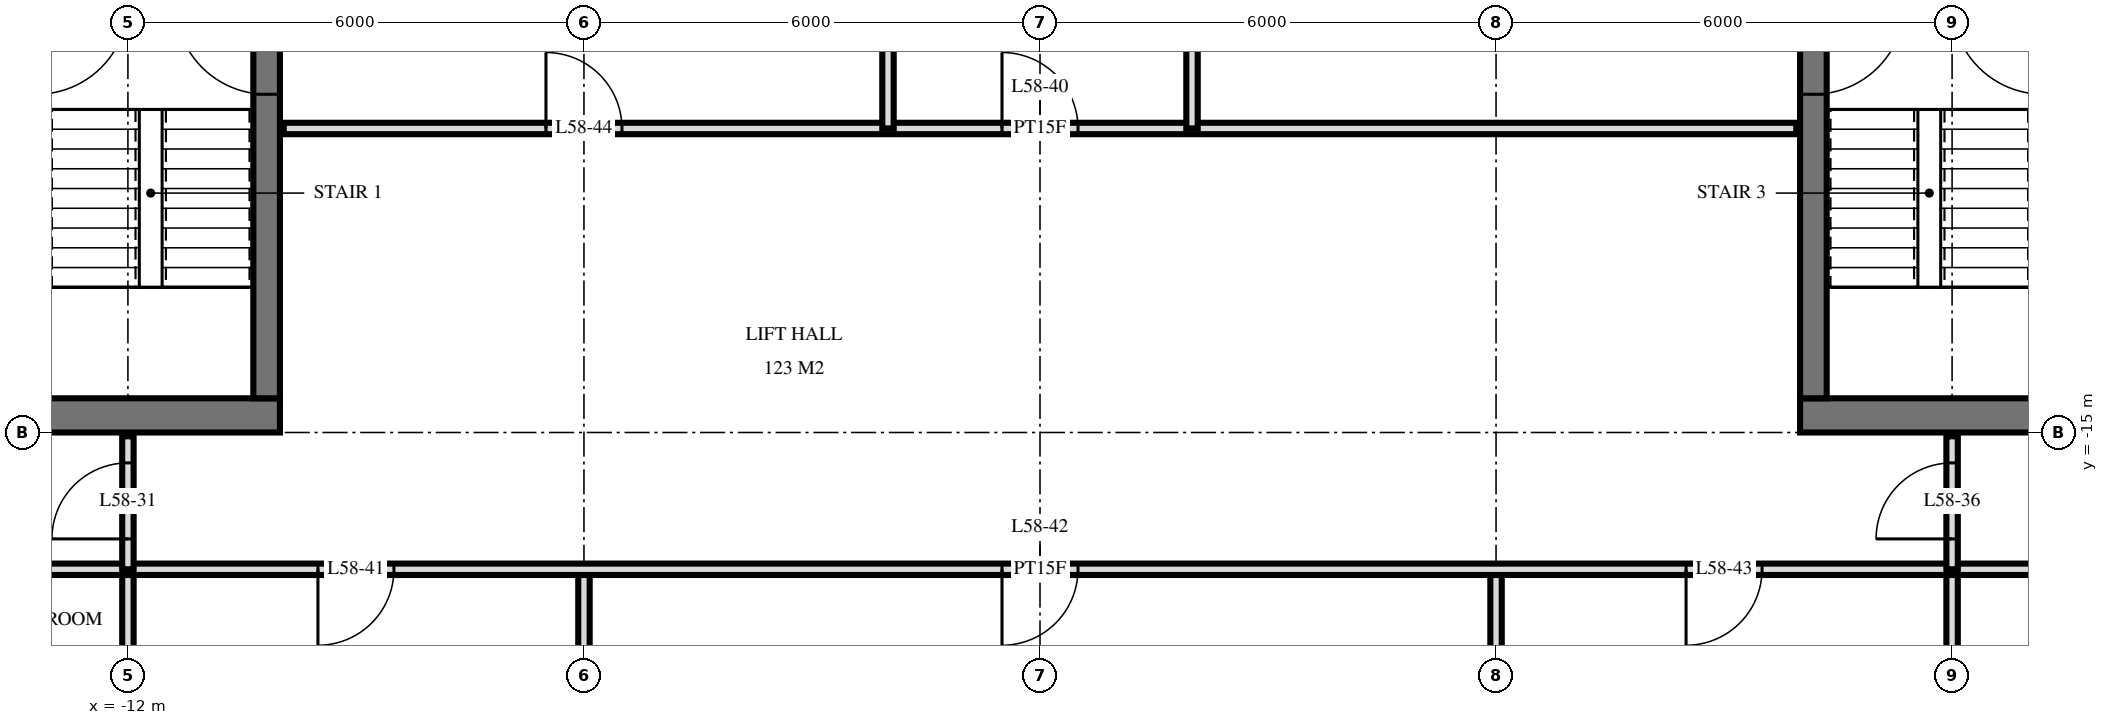
"""IFC4 building model, lengths in metres.
Left out: names, types, materials, properties, quantities, classifications, styles, units other than length and angle.
Written with IfcOpenShell. Run it as: python <this file> out.ifc"""

import sys

from ifc_helpers import new_model, si_unit, direction, frame, frame_2d, origin, place, context, subcontext, project, spatial, rectangle, extrude, element, fill, save


model = new_model("IFC4")
c1 = context("Model", 3, precision=1e-05, world=origin(), true_north=direction((0.0, 1.0)))
c2 = subcontext(c1, "Body", "Model", "MODEL_VIEW")
j1 = project(units=[si_unit("LENGTHUNIT", "METRE"), si_unit("PLANEANGLEUNIT", "RADIAN")], contexts=[c1])
p1 = place(None, origin())
s1 = spatial("IfcSite", under=j1, at=p1, CompositionType="ELEMENT")
p2 = place(p1, origin())
s2 = spatial("IfcBuilding", under=s1, at=p2, CompositionType="ELEMENT")
p3 = place(p2, frame((0.0, 0.0, 222.1)))
s3 = spatial("IfcBuildingStorey", under=s2, at=p3, CompositionType="ELEMENT", Elevation=222.1)
p4 = place(p3, frame((-24.5, -14.775, 0.0), z_axis=(0.0, 0.0, 1.0), x_axis=(1.0, 0.0, 0.0)))
e1 = element("IfcWall", 1, at=p4, inside=s3, PredefinedType="SHEAR", context=c2, shape_type="SweptSolid", body=[
    extrude(rectangle(XDim=14.5, YDim=0.45, at=frame_2d((7.25, 0.0))), origin(), (0.0, 0.0, 1.0), 3.5),
])
p5 = place(p4, frame((6.2, 0.0, 0.0)))
e2 = element("IfcOpeningElement", 2, at=p5, cuts=e1, PredefinedType="OPENING", context=c2, shape_type="SweptSolid", body=[
    extrude(rectangle(XDim=1.2, YDim=2.1, at=frame_2d((0.6, 1.05))), frame((0.0, 0.235, 0.0), z_axis=(0.0, -1.0, 0.0), x_axis=(1.0, 0.0, 0.0)), (0.0, 0.0, 1.0), 0.47),
])
p6 = place(p4, frame((9.25, 0.0, 0.0)))
e3 = element("IfcOpeningElement", 3, at=p6, cuts=e1, PredefinedType="OPENING", context=c2, shape_type="SweptSolid", body=[
    extrude(rectangle(XDim=1.1, YDim=2.1, at=frame_2d((0.55, 1.05))), frame((0.0, 0.235, 0.0), z_axis=(0.0, -1.0, 0.0), x_axis=(1.0, 0.0, 0.0)), (0.0, 0.0, 1.0), 0.47),
])
p7 = place(p4, frame((3.5, 0.0, 0.0)))
e4 = element("IfcOpeningElement", 4, at=p7, cuts=e1, PredefinedType="OPENING", context=c2, shape_type="SweptSolid", body=[
    extrude(rectangle(XDim=0.9, YDim=2.1, at=frame_2d((0.45, 1.05))), frame((0.0, 0.235, 0.0), z_axis=(0.0, -1.0, 0.0), x_axis=(1.0, 0.0, 0.0)), (0.0, 0.0, 1.0), 0.47),
])
p8 = place(p4, frame((1.05, 0.0, 0.0)))
e5 = element("IfcOpeningElement", 5, at=p8, cuts=e1, PredefinedType="OPENING", context=c2, shape_type="SweptSolid", body=[
    extrude(rectangle(XDim=1.0, YDim=2.1, at=frame_2d((0.5, 1.05))), frame((0.0, 0.235, 0.0), z_axis=(0.0, -1.0, 0.0), x_axis=(1.0, 0.0, 0.0)), (0.0, 0.0, 1.0), 0.47),
])
p9 = place(p3, frame((-10.175, -14.55, 0.0), z_axis=(0.0, 0.0, 1.0), x_axis=(0.0, 1.0, 0.0)))
e6 = element("IfcWall", 6, at=p9, inside=s3, PredefinedType="SHEAR", context=c2, shape_type="SweptSolid", body=[
    extrude(rectangle(XDim=14.1, YDim=0.35, at=frame_2d((7.05, 0.0))), origin(), (0.0, 0.0, 1.0), 3.5),
])
p10 = place(p9, frame((8.4, 0.0, 0.0)))
e7 = element("IfcOpeningElement", 7, at=p10, cuts=e6, PredefinedType="OPENING", context=c2, shape_type="SweptSolid", body=[
    extrude(rectangle(XDim=1.4, YDim=2.4, at=frame_2d((0.7, 1.2))), frame((0.0, 0.185, 0.0), z_axis=(0.0, -1.0, 0.0), x_axis=(1.0, 0.0, 0.0)), (0.0, 0.0, 1.0), 0.37),
])
p11 = place(p9, frame((10.0, 0.0, 0.0)))
e8 = element("IfcOpeningElement", 8, at=p11, cuts=e6, PredefinedType="OPENING", context=c2, shape_type="SweptSolid", body=[
    extrude(rectangle(XDim=1.4, YDim=2.4, at=frame_2d((0.7, 1.2))), frame((0.0, 0.185, 0.0), z_axis=(0.0, -1.0, 0.0), x_axis=(1.0, 0.0, 0.0)), (0.0, 0.0, 1.0), 0.37),
])
p12 = place(p9, frame((4.0, 0.0, 0.0)))
e9 = element("IfcOpeningElement", 9, at=p12, cuts=e6, PredefinedType="OPENING", context=c2, shape_type="SweptSolid", body=[
    extrude(rectangle(XDim=1.2, YDim=2.1, at=frame_2d((0.6, 1.05))), frame((0.0, 0.185, 0.0), z_axis=(0.0, -1.0, 0.0), x_axis=(1.0, 0.0, 0.0)), (0.0, 0.0, 1.0), 0.37),
])
p13 = place(p3, frame((10.0, -14.775, 0.0), z_axis=(0.0, 0.0, 1.0), x_axis=(1.0, 0.0, 0.0)))
e10 = element("IfcWall", 10, at=p13, inside=s3, PredefinedType="SHEAR", context=c2, shape_type="SweptSolid", body=[
    extrude(rectangle(XDim=14.5, YDim=0.45, at=frame_2d((7.25, 0.0))), origin(), (0.0, 0.0, 1.0), 3.5),
])
p14 = place(p13, frame((7.1, 0.0, 0.0)))
e11 = element("IfcOpeningElement", 11, at=p14, cuts=e10, PredefinedType="OPENING", context=c2, shape_type="SweptSolid", body=[
    extrude(rectangle(XDim=1.2, YDim=2.1, at=frame_2d((0.6, 1.05))), frame((0.0, 0.235, 0.0), z_axis=(0.0, -1.0, 0.0), x_axis=(1.0, 0.0, 0.0)), (0.0, 0.0, 1.0), 0.47),
])
p15 = place(p13, frame((4.15, 0.0, 0.0)))
e12 = element("IfcOpeningElement", 12, at=p15, cuts=e10, PredefinedType="OPENING", context=c2, shape_type="SweptSolid", body=[
    extrude(rectangle(XDim=1.1, YDim=2.1, at=frame_2d((0.55, 1.05))), frame((0.0, 0.235, 0.0), z_axis=(0.0, -1.0, 0.0), x_axis=(1.0, 0.0, 0.0)), (0.0, 0.0, 1.0), 0.47),
])
p16 = place(p13, frame((10.1, 0.0, 0.0)))
e13 = element("IfcOpeningElement", 13, at=p16, cuts=e10, PredefinedType="OPENING", context=c2, shape_type="SweptSolid", body=[
    extrude(rectangle(XDim=0.9, YDim=2.1, at=frame_2d((0.45, 1.05))), frame((0.0, 0.235, 0.0), z_axis=(0.0, -1.0, 0.0), x_axis=(1.0, 0.0, 0.0)), (0.0, 0.0, 1.0), 0.47),
])
p17 = place(p13, frame((12.45, 0.0, 0.0)))
e14 = element("IfcOpeningElement", 14, at=p17, cuts=e10, PredefinedType="OPENING", context=c2, shape_type="SweptSolid", body=[
    extrude(rectangle(XDim=1.0, YDim=2.1, at=frame_2d((0.5, 1.05))), frame((0.0, 0.235, 0.0), z_axis=(0.0, -1.0, 0.0), x_axis=(1.0, 0.0, 0.0)), (0.0, 0.0, 1.0), 0.47),
])
p18 = place(p3, frame((10.175, -14.55, 0.0), z_axis=(0.0, 0.0, 1.0), x_axis=(0.0, 1.0, 0.0)))
e15 = element("IfcWall", 15, at=p18, inside=s3, PredefinedType="SHEAR", context=c2, shape_type="SweptSolid", body=[
    extrude(rectangle(XDim=14.1, YDim=0.35, at=frame_2d((7.05, 0.0))), origin(), (0.0, 0.0, 1.0), 3.5),
])
p19 = place(p18, frame((8.4, 0.0, 0.0)))
e16 = element("IfcOpeningElement", 16, at=p19, cuts=e15, PredefinedType="OPENING", context=c2, shape_type="SweptSolid", body=[
    extrude(rectangle(XDim=1.4, YDim=2.4, at=frame_2d((0.7, 1.2))), frame((0.0, 0.185, 0.0), z_axis=(0.0, -1.0, 0.0), x_axis=(1.0, 0.0, 0.0)), (0.0, 0.0, 1.0), 0.37),
])
p20 = place(p18, frame((10.0, 0.0, 0.0)))
e17 = element("IfcOpeningElement", 17, at=p20, cuts=e15, PredefinedType="OPENING", context=c2, shape_type="SweptSolid", body=[
    extrude(rectangle(XDim=1.4, YDim=2.4, at=frame_2d((0.7, 1.2))), frame((0.0, 0.185, 0.0), z_axis=(0.0, -1.0, 0.0), x_axis=(1.0, 0.0, 0.0)), (0.0, 0.0, 1.0), 0.37),
])
p21 = place(p18, frame((4.0, 0.0, 0.0)))
e18 = element("IfcOpeningElement", 18, at=p21, cuts=e15, PredefinedType="OPENING", context=c2, shape_type="SweptSolid", body=[
    extrude(rectangle(XDim=1.2, YDim=2.1, at=frame_2d((0.6, 1.05))), frame((0.0, 0.185, 0.0), z_axis=(0.0, -1.0, 0.0), x_axis=(1.0, 0.0, 0.0)), (0.0, 0.0, 1.0), 0.37),
])
p22 = place(p3, frame((12.0, -16.8, 0.0), z_axis=(0.0, 0.0, 1.0), x_axis=(0.0, 1.0, 0.0)))
e19 = element("IfcWall", 19, at=p22, inside=s3, PredefinedType="PARTITIONING", context=c2, shape_type="SweptSolid", body=[
    extrude(rectangle(XDim=1.75, YDim=0.15, at=frame_2d((0.875, 0.0))), origin(), (0.0, 0.0, 1.0), 3.22),
])
p23 = place(p22, frame((0.4, 0.0, 0.0)))
e20 = element("IfcOpeningElement", 20, at=p23, cuts=e19, PredefinedType="OPENING", context=c2, shape_type="SweptSolid", body=[
    extrude(rectangle(XDim=1.0, YDim=2.1, at=frame_2d((0.5, 1.05))), frame((0.0, 0.085, 0.0), z_axis=(0.0, -1.0, 0.0), x_axis=(1.0, 0.0, 0.0)), (0.0, 0.0, 1.0), 0.17),
])
for number, where, z_axis, x_axis in (
    (21, (12.0, -29.22, 0.0), (0.0, 0.0, 1.0), (0.0, 1.0, 0.0)),
    (22, (6.0, -29.22, 0.0), (0.0, 0.0, 1.0), (0.0, 1.0, 0.0)),
):
    element("IfcWall", number, at=place(p3, frame(where, z_axis=z_axis, x_axis=x_axis)), inside=s3, PredefinedType="PARTITIONING", context=c2, shape_type="SweptSolid", body=[
        extrude(rectangle(XDim=12.42, YDim=0.15, at=frame_2d((6.21, 0.0))), origin(), (0.0, 0.0, 1.0), 3.22),
    ])
for number, where, z_axis, x_axis in (
    (23, (2.0, -11.0, 0.0), (0.0, 0.0, 1.0), (0.0, 1.0, 0.0)),
    (24, (-2.0, -11.0, 0.0), (0.0, 0.0, 1.0), (0.0, 1.0, 0.0)),
):
    element("IfcWall", number, at=place(p3, frame(where, z_axis=z_axis, x_axis=x_axis)), inside=s3, PredefinedType="PARTITIONING", context=c2, shape_type="SweptSolid", body=[
        extrude(rectangle(XDim=4.0, YDim=0.15, at=frame_2d((2.0, 0.0))), origin(), (0.0, 0.0, 1.0), 3.22),
    ])
p24 = place(p3, frame((-6.0, -29.22, 0.0), z_axis=(0.0, 0.0, 1.0), x_axis=(0.0, 1.0, 0.0)))
e25 = element("IfcWall", 25, at=p24, inside=s3, PredefinedType="PARTITIONING", context=c2, shape_type="SweptSolid", body=[
    extrude(rectangle(XDim=12.42, YDim=0.15, at=frame_2d((6.21, 0.0))), origin(), (0.0, 0.0, 1.0), 3.22),
])
p25 = place(p3, frame((-12.0, -16.8, 0.0), z_axis=(0.0, 0.0, 1.0), x_axis=(0.0, 1.0, 0.0)))
e26 = element("IfcWall", 26, at=p25, inside=s3, PredefinedType="PARTITIONING", context=c2, shape_type="SweptSolid", body=[
    extrude(rectangle(XDim=1.75, YDim=0.15, at=frame_2d((0.875, 0.0))), origin(), (0.0, 0.0, 1.0), 3.22),
])
p26 = place(p25, frame((0.4, 0.0, 0.0)))
e27 = element("IfcOpeningElement", 27, at=p26, cuts=e26, PredefinedType="OPENING", context=c2, shape_type="SweptSolid", body=[
    extrude(rectangle(XDim=1.0, YDim=2.1, at=frame_2d((0.5, 1.05))), frame((0.0, 0.085, 0.0), z_axis=(0.0, -1.0, 0.0), x_axis=(1.0, 0.0, 0.0)), (0.0, 0.0, 1.0), 0.17),
])
p27 = place(p3, frame((-12.0, -29.22, 0.0), z_axis=(0.0, 0.0, 1.0), x_axis=(0.0, 1.0, 0.0)))
e28 = element("IfcWall", 28, at=p27, inside=s3, PredefinedType="PARTITIONING", context=c2, shape_type="SweptSolid", body=[
    extrude(rectangle(XDim=12.42, YDim=0.15, at=frame_2d((6.21, 0.0))), origin(), (0.0, 0.0, 1.0), 3.22),
])
p28 = place(p3, frame((-26.82, -16.8, 0.0), z_axis=(0.0, 0.0, 1.0), x_axis=(1.0, 0.0, 0.0)))
e29 = element("IfcWall", 29, at=p28, inside=s3, PredefinedType="PARTITIONING", context=c2, shape_type="SweptSolid", body=[
    extrude(rectangle(XDim=53.64, YDim=0.15, at=frame_2d((26.82, 0.0))), origin(), (0.0, 0.0, 1.0), 3.22),
])
p29 = place(p28, frame((11.17, 0.0, 0.0)))
e30 = element("IfcOpeningElement", 30, at=p29, cuts=e29, PredefinedType="OPENING", context=c2, shape_type="SweptSolid", body=[
    extrude(rectangle(XDim=1.0, YDim=2.1, at=frame_2d((0.5, 1.05))), frame((0.0, 0.085, 0.0), z_axis=(0.0, -1.0, 0.0), x_axis=(1.0, 0.0, 0.0)), (0.0, 0.0, 1.0), 0.17),
])
p30 = place(p28, frame((3.22, 0.0, 0.0)))
e31 = element("IfcOpeningElement", 31, at=p30, cuts=e29, PredefinedType="OPENING", context=c2, shape_type="SweptSolid", body=[
    extrude(rectangle(XDim=1.0, YDim=2.1, at=frame_2d((0.5, 1.05))), frame((0.0, 0.085, 0.0), z_axis=(0.0, -1.0, 0.0), x_axis=(1.0, 0.0, 0.0)), (0.0, 0.0, 1.0), 0.17),
])
p31 = place(p28, frame((5.02, 0.0, 0.0)))
e32 = element("IfcOpeningElement", 32, at=p31, cuts=e29, PredefinedType="OPENING", context=c2, shape_type="SweptSolid", body=[
    extrude(rectangle(XDim=1.0, YDim=2.1, at=frame_2d((0.5, 1.05))), frame((0.0, 0.085, 0.0), z_axis=(0.0, -1.0, 0.0), x_axis=(1.0, 0.0, 0.0)), (0.0, 0.0, 1.0), 0.17),
])
p32 = place(p28, frame((47.72, 0.0, 0.0)))
e33 = element("IfcOpeningElement", 33, at=p32, cuts=e29, PredefinedType="OPENING", context=c2, shape_type="SweptSolid", body=[
    extrude(rectangle(XDim=1.0, YDim=2.1, at=frame_2d((0.5, 1.05))), frame((0.0, 0.085, 0.0), z_axis=(0.0, -1.0, 0.0), x_axis=(1.0, 0.0, 0.0)), (0.0, 0.0, 1.0), 0.17),
])
p33 = place(p28, frame((51.04, 0.0, 0.0)))
e34 = element("IfcOpeningElement", 34, at=p33, cuts=e29, PredefinedType="OPENING", context=c2, shape_type="SweptSolid", body=[
    extrude(rectangle(XDim=1.0, YDim=2.1, at=frame_2d((0.5, 1.05))), frame((0.0, 0.085, 0.0), z_axis=(0.0, -1.0, 0.0), x_axis=(1.0, 0.0, 0.0)), (0.0, 0.0, 1.0), 0.17),
])
p34 = place(p28, frame((17.32, 0.0, 0.0)))
e35 = element("IfcOpeningElement", 35, at=p34, cuts=e29, PredefinedType="OPENING", context=c2, shape_type="SweptSolid", body=[
    extrude(rectangle(XDim=1.0, YDim=2.1, at=frame_2d((0.5, 1.05))), frame((0.0, 0.085, 0.0), z_axis=(0.0, -1.0, 0.0), x_axis=(1.0, 0.0, 0.0)), (0.0, 0.0, 1.0), 0.17),
])
p35 = place(p28, frame((26.32, 0.0, 0.0)))
e36 = element("IfcOpeningElement", 36, at=p35, cuts=e29, PredefinedType="OPENING", context=c2, shape_type="SweptSolid", body=[
    extrude(rectangle(XDim=1.0, YDim=2.1, at=frame_2d((0.5, 1.05))), frame((0.0, 0.085, 0.0), z_axis=(0.0, -1.0, 0.0), x_axis=(1.0, 0.0, 0.0)), (0.0, 0.0, 1.0), 0.17),
])
p36 = place(p28, frame((35.32, 0.0, 0.0)))
e37 = element("IfcOpeningElement", 37, at=p36, cuts=e29, PredefinedType="OPENING", context=c2, shape_type="SweptSolid", body=[
    extrude(rectangle(XDim=1.0, YDim=2.1, at=frame_2d((0.5, 1.05))), frame((0.0, 0.085, 0.0), z_axis=(0.0, -1.0, 0.0), x_axis=(1.0, 0.0, 0.0)), (0.0, 0.0, 1.0), 0.17),
])
p37 = place(p3, frame((-9.95, -11.0, 0.0), z_axis=(0.0, 0.0, 1.0), x_axis=(1.0, 0.0, 0.0)))
e38 = element("IfcWall", 38, at=p37, inside=s3, PredefinedType="PARTITIONING", context=c2, shape_type="SweptSolid", body=[
    extrude(rectangle(XDim=19.9, YDim=0.15, at=frame_2d((9.95, 0.0))), origin(), (0.0, 0.0, 1.0), 3.22),
])
p38 = place(p37, frame((9.45, 0.0, 0.0)))
e39 = element("IfcOpeningElement", 39, at=p38, cuts=e38, PredefinedType="OPENING", context=c2, shape_type="SweptSolid", body=[
    extrude(rectangle(XDim=1.0, YDim=2.1, at=frame_2d((0.5, 1.05))), frame((0.0, 0.085, 0.0), z_axis=(0.0, -1.0, 0.0), x_axis=(1.0, 0.0, 0.0)), (0.0, 0.0, 1.0), 0.17),
])
p39 = place(p37, frame((3.45, 0.0, 0.0)))
e40 = element("IfcOpeningElement", 40, at=p39, cuts=e38, PredefinedType="OPENING", context=c2, shape_type="SweptSolid", body=[
    extrude(rectangle(XDim=1.0, YDim=2.1, at=frame_2d((0.5, 1.05))), frame((0.0, 0.085, 0.0), z_axis=(0.0, -1.0, 0.0), x_axis=(1.0, 0.0, 0.0)), (0.0, 0.0, 1.0), 0.17),
])
p40 = place(p12, origin())
e41 = element("IfcDoor", 41, at=p40, inside=s3, OperationType="SINGLE_SWING_LEFT", PredefinedType="DOOR", context=c2, shape_type="SweptSolid", body=[
    extrude(rectangle(XDim=1.2, YDim=2.1, at=frame_2d((0.6, 1.05))), frame((0.0, 0.025, 0.0), z_axis=(0.0, -1.0, 0.0), x_axis=(1.0, 0.0, 0.0)), (0.0, 0.0, 1.0), 0.05),
])
fill(e9, e41)
p41 = place(p21, frame((0.6, 0.0, 0.0), z_axis=(0.0, 0.0, 1.0), x_axis=(-1.0, 0.0, 0.0)))
e42 = element("IfcDoor", 42, at=p41, inside=s3, OperationType="SINGLE_SWING_RIGHT", PredefinedType="DOOR", context=c2, shape_type="SweptSolid", body=[
    extrude(rectangle(XDim=1.2, YDim=2.1, at=frame_2d((0.0, 1.05))), frame((0.0, -0.025, 0.0), z_axis=(0.0, 1.0, 0.0), x_axis=(-1.0, 0.0, 0.0)), (0.0, 0.0, 1.0), 0.05),
])
fill(e18, e42)
p42 = place(p26, origin())
e43 = element("IfcDoor", 43, at=p42, inside=s3, OperationType="SINGLE_SWING_RIGHT", PredefinedType="DOOR", context=c2, shape_type="SweptSolid", body=[
    extrude(rectangle(XDim=1.0, YDim=2.1, at=frame_2d((0.5, 1.05))), frame((0.0, 0.025, 0.0), z_axis=(0.0, -1.0, 0.0), x_axis=(1.0, 0.0, 0.0)), (0.0, 0.0, 1.0), 0.05),
])
fill(e27, e43)
p43 = place(p23, origin())
e44 = element("IfcDoor", 44, at=p43, inside=s3, OperationType="SINGLE_SWING_RIGHT", PredefinedType="DOOR", context=c2, shape_type="SweptSolid", body=[
    extrude(rectangle(XDim=1.0, YDim=2.1, at=frame_2d((0.5, 1.05))), frame((0.0, 0.025, 0.0), z_axis=(0.0, -1.0, 0.0), x_axis=(1.0, 0.0, 0.0)), (0.0, 0.0, 1.0), 0.05),
])
fill(e20, e44)
p44 = place(p38, origin())
e45 = element("IfcDoor", 45, at=p44, inside=s3, OperationType="SINGLE_SWING_RIGHT", PredefinedType="DOOR", context=c2, shape_type="SweptSolid", body=[
    extrude(rectangle(XDim=1.0, YDim=2.1, at=frame_2d((0.5, 1.05))), frame((0.0, 0.025, 0.0), z_axis=(0.0, -1.0, 0.0), x_axis=(1.0, 0.0, 0.0)), (0.0, 0.0, 1.0), 0.05),
])
fill(e39, e45)
p45 = place(p34, frame((0.5, 0.0, 0.0), z_axis=(0.0, 0.0, 1.0), x_axis=(-1.0, 0.0, 0.0)))
e46 = element("IfcDoor", 46, at=p45, inside=s3, OperationType="SINGLE_SWING_LEFT", PredefinedType="DOOR", context=c2, shape_type="SweptSolid", body=[
    extrude(rectangle(XDim=1.0, YDim=2.1, at=frame_2d((0.0, 1.05))), frame((0.0, -0.025, 0.0), z_axis=(0.0, 1.0, 0.0), x_axis=(-1.0, 0.0, 0.0)), (0.0, 0.0, 1.0), 0.05),
])
fill(e35, e46)
p46 = place(p35, frame((0.5, 0.0, 0.0), z_axis=(0.0, 0.0, 1.0), x_axis=(-1.0, 0.0, 0.0)))
e47 = element("IfcDoor", 47, at=p46, inside=s3, OperationType="SINGLE_SWING_LEFT", PredefinedType="DOOR", context=c2, shape_type="SweptSolid", body=[
    extrude(rectangle(XDim=1.0, YDim=2.1, at=frame_2d((0.0, 1.05))), frame((0.0, -0.025, 0.0), z_axis=(0.0, 1.0, 0.0), x_axis=(-1.0, 0.0, 0.0)), (0.0, 0.0, 1.0), 0.05),
])
fill(e36, e47)
p47 = place(p36, frame((0.5, 0.0, 0.0), z_axis=(0.0, 0.0, 1.0), x_axis=(-1.0, 0.0, 0.0)))
e48 = element("IfcDoor", 48, at=p47, inside=s3, OperationType="SINGLE_SWING_LEFT", PredefinedType="DOOR", context=c2, shape_type="SweptSolid", body=[
    extrude(rectangle(XDim=1.0, YDim=2.1, at=frame_2d((0.0, 1.05))), frame((0.0, -0.025, 0.0), z_axis=(0.0, 1.0, 0.0), x_axis=(-1.0, 0.0, 0.0)), (0.0, 0.0, 1.0), 0.05),
])
fill(e37, e48)
p48 = place(p39, origin())
e49 = element("IfcDoor", 49, at=p48, inside=s3, OperationType="SINGLE_SWING_RIGHT", PredefinedType="DOOR", context=c2, shape_type="SweptSolid", body=[
    extrude(rectangle(XDim=1.0, YDim=2.1, at=frame_2d((0.5, 1.05))), frame((0.0, 0.025, 0.0), z_axis=(0.0, -1.0, 0.0), x_axis=(1.0, 0.0, 0.0)), (0.0, 0.0, 1.0), 0.05),
])
fill(e40, e49)
save(model, sys.argv[1])
